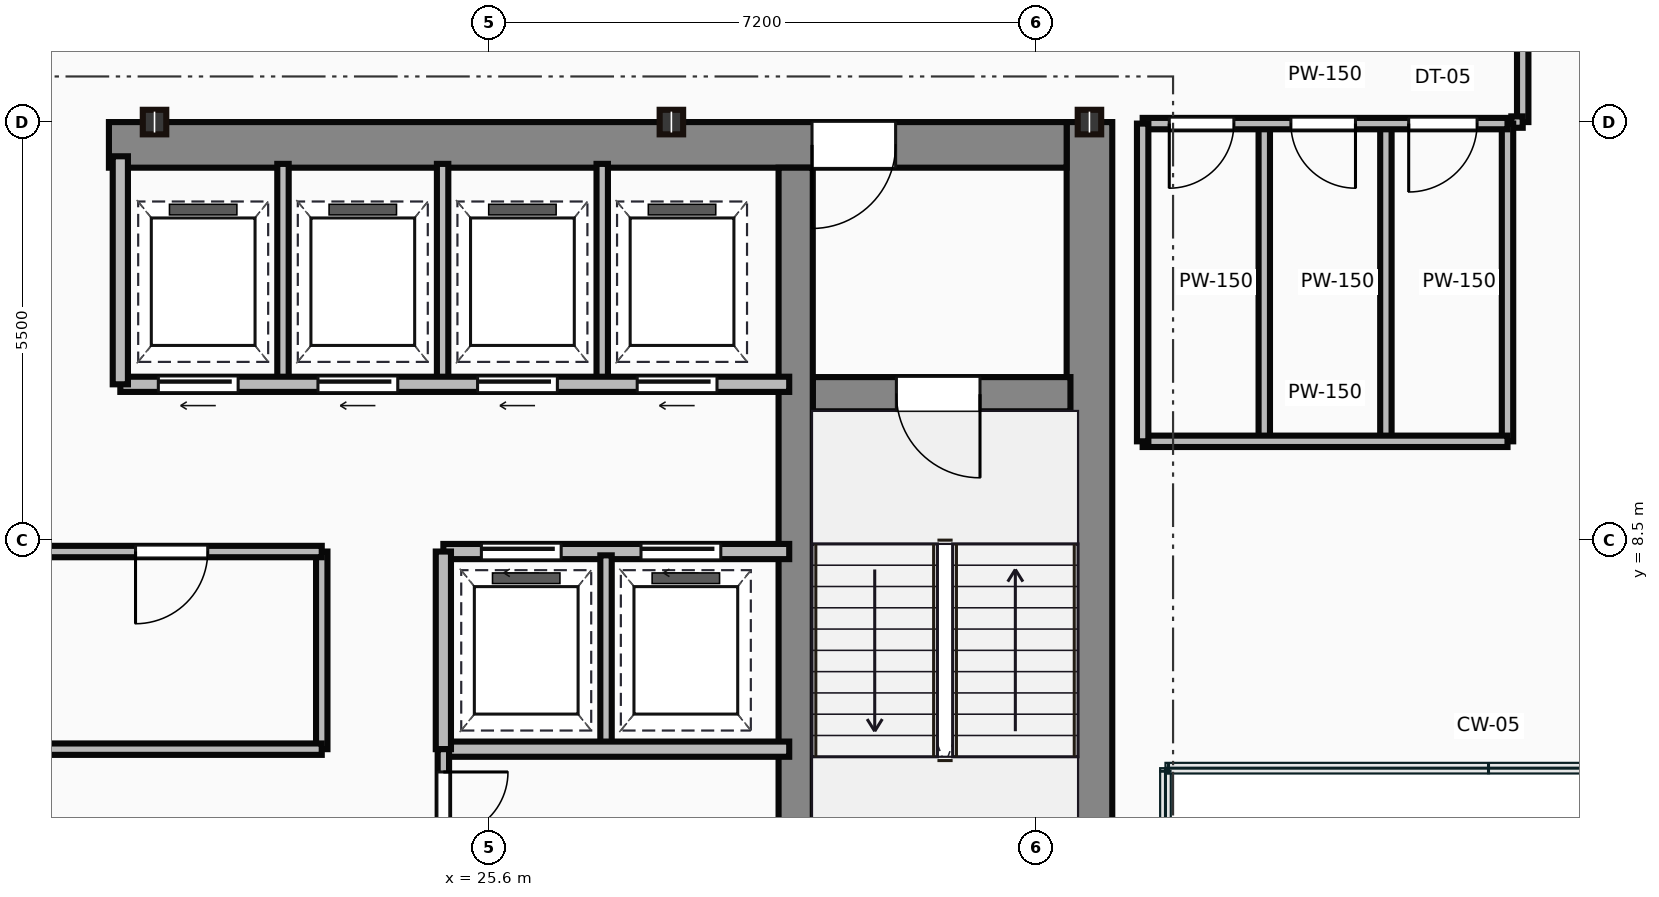
"""IFC4 building model, lengths in metres.
Left out: names, types, materials, properties, quantities, classifications, styles, units other than length and angle.
Written with IfcOpenShell. Run it as: python <this file> out.ifc"""

import sys

from ifc_helpers import new_model, si_unit, direction, frame, frame_2d, origin, origin_2d, place, context, subcontext, project, spatial, rectangle, i_section, extrude, source, transform, mapped, element, fill, save


model = new_model("IFC4")
c1 = context("Model", 3, precision=1e-05, world=origin(), true_north=direction((0.0, 1.0)))
c2 = subcontext(c1, "Body", "Model", "MODEL_VIEW")
j1 = project(units=[si_unit("LENGTHUNIT", "METRE"), si_unit("PLANEANGLEUNIT", "RADIAN")], contexts=[c1])
p1 = place(None, origin())
s1 = spatial("IfcSite", under=j1, at=p1, CompositionType="ELEMENT")
p2 = place(p1, origin())
s2 = spatial("IfcBuilding", under=s1, at=p2, CompositionType="ELEMENT")
p3 = place(p2, frame((0.0, 0.0, 262.45)))
s3 = spatial("IfcBuildingStorey", under=s2, at=p3, CompositionType="ELEMENT", Elevation=262.45)
m1 = source(origin(), c2, "Body", "SweptSolid", [
    extrude(rectangle(XDim=13.1, YDim=0.6, at=frame_2d((6.55, 0.0))), origin(), (0.0, 0.0, 1.0), 3.65),
])
p4 = place(p3, frame((33.5, 0.9, 0.0), z_axis=(0.0, 0.0, 1.0), x_axis=(0.0, 1.0, 0.0)))
e1 = element("IfcWall", 1, at=p4, inside=s3, PredefinedType="SHEAR", context=c2, shape_type="MappedRepresentation", body=[
    mapped(m1, transform((0.0, 0.0, 0.0))),
])
m2 = source(origin(), c2, "Body", "SweptSolid", [
    extrude(rectangle(XDim=12.6, YDim=0.6, at=frame_2d((6.3, 0.0))), origin(), (0.0, 0.0, 1.0), 3.65),
])
p5 = place(p3, frame((20.6, 13.7, 0.0), z_axis=(0.0, 0.0, 1.0), x_axis=(1.0, 0.0, 0.0)))
e2 = element("IfcWall", 2, at=p5, inside=s3, PredefinedType="SHEAR", context=c2, shape_type="MappedRepresentation", body=[
    mapped(m2, transform((0.0, 0.0, 0.0))),
])
p6 = place(p5, frame((9.25, 0.0, 0.0)))
e3 = element("IfcOpeningElement", 3, at=p6, cuts=e2, PredefinedType="OPENING", context=c2, shape_type="SweptSolid", body=[
    extrude(rectangle(XDim=1.1, YDim=2.15, at=frame_2d((0.55, 1.075))), frame((0.0, 0.31, 0.0), z_axis=(0.0, -1.0, 0.0), x_axis=(1.0, 0.0, 0.0)), (0.0, 0.0, 1.0), 0.62),
])
m3 = source(origin(), c2, "Body", "SweptSolid", [
    extrude(rectangle(XDim=12.5, YDim=0.45, at=frame_2d((6.25, 0.0))), origin(), (0.0, 0.0, 1.0), 3.65),
])
p7 = place(p3, frame((29.635, 0.9, 0.0), z_axis=(0.0, 0.0, 1.0), x_axis=(0.0, 1.0, 0.0)))
e4 = element("IfcWall", 4, at=p7, inside=s3, PredefinedType="SHEAR", context=c2, shape_type="MappedRepresentation", body=[
    mapped(m3, transform((0.0, 0.0, 0.0))),
])
m4 = source(origin(), c2, "Body", "SweptSolid", [
    extrude(rectangle(XDim=3.39, YDim=0.45, at=frame_2d((1.695, 0.0))), origin(), (0.0, 0.0, 1.0), 3.65),
])
p8 = place(p3, frame((29.86, 10.42, 0.0), z_axis=(0.0, 0.0, 1.0), x_axis=(1.0, 0.0, 0.0)))
e5 = element("IfcWall", 5, at=p8, inside=s3, PredefinedType="SHEAR", context=c2, shape_type="MappedRepresentation", body=[
    mapped(m4, transform((0.0, 0.0, 0.0))),
])
p9 = place(p8, frame((1.1, 0.0, 0.0)))
e6 = element("IfcOpeningElement", 6, at=p9, cuts=e5, PredefinedType="OPENING", context=c2, shape_type="SweptSolid", body=[
    extrude(rectangle(XDim=1.1, YDim=2.15, at=frame_2d((0.55, 1.075))), frame((0.0, 0.235, 0.0), z_axis=(0.0, -1.0, 0.0), x_axis=(1.0, 0.0, 0.0)), (0.0, 0.0, 1.0), 0.47),
])
m5 = source(origin(), c2, "Body", "SweptSolid", [
    extrude(i_section(OverallWidth=0.309, OverallDepth=0.323, WebThickness=0.014, FlangeThickness=0.023, at=origin_2d()), origin(), (0.0, 0.0, 1.0), 3.65),
])
for number, where, z_axis, x_axis in (
    (7, (21.2, 14.0, 0.0), (0.0, 0.0, 1.0), (1.0, 0.0, 0.0)),
    (8, (28.0, 14.0, 0.0), (0.0, 0.0, 1.0), (1.0, 0.0, 0.0)),
    (9, (33.5, 14.0, 0.0), (0.0, 0.0, 1.0), (1.0, 0.0, 0.0)),
):
    element("IfcColumn", number, at=place(p3, frame(where, z_axis=z_axis, x_axis=x_axis)), inside=s3, PredefinedType="COLUMN", context=c2, shape_type="MappedRepresentation", body=[
        mapped(m5, transform((0.0, 0.0, 0.0))),
    ])
m6 = source(origin(), c2, "Body", "SweptSolid", [
    extrude(rectangle(XDim=11.85, YDim=0.15, at=frame_2d((5.925, 0.0))), origin(), (0.0, 0.0, 1.0), 3.4),
])
p10 = place(p3, frame((11.55, 5.75, 0.0), z_axis=(0.0, 0.0, 1.0), x_axis=(1.0, 0.0, 0.0)))
e10 = element("IfcWall", 10, at=p10, inside=s3, PredefinedType="PARTITIONING", context=c2, shape_type="MappedRepresentation", body=[
    mapped(m6, transform((0.0, 0.0, 0.0))),
])
p11 = place(p3, frame((11.55, 8.35, 0.0), z_axis=(0.0, 0.0, 1.0), x_axis=(1.0, 0.0, 0.0)))
e11 = element("IfcWall", 11, at=p11, inside=s3, PredefinedType="PARTITIONING", context=c2, shape_type="MappedRepresentation", body=[
    mapped(m6, transform((0.0, 0.0, 0.0))),
])
p12 = place(p11, frame((1.1, 0.0, 0.0)))
e12 = element("IfcOpeningElement", 12, at=p12, cuts=e11, PredefinedType="OPENING", context=c2, shape_type="SweptSolid", body=[
    extrude(rectangle(XDim=0.95, YDim=2.15, at=frame_2d((0.475, 1.075))), frame((0.0, 0.085, 0.0), z_axis=(0.0, -1.0, 0.0), x_axis=(1.0, 0.0, 0.0)), (0.0, 0.0, 1.0), 0.17),
])
p13 = place(p11, frame((9.4, 0.0, 0.0)))
e13 = element("IfcOpeningElement", 13, at=p13, cuts=e11, PredefinedType="OPENING", context=c2, shape_type="SweptSolid", body=[
    extrude(rectangle(XDim=0.95, YDim=2.15, at=frame_2d((0.475, 1.075))), frame((0.0, 0.085, 0.0), z_axis=(0.0, -1.0, 0.0), x_axis=(1.0, 0.0, 0.0)), (0.0, 0.0, 1.0), 0.17),
])
m7 = source(origin(), c2, "Body", "SweptSolid", [
    extrude(rectangle(XDim=2.6, YDim=0.15, at=frame_2d((1.3, 0.0))), origin(), (0.0, 0.0, 1.0), 3.4),
])
p14 = place(p3, frame((23.4, 5.75, 0.0), z_axis=(0.0, 0.0, 1.0), x_axis=(0.0, 1.0, 0.0)))
e14 = element("IfcWall", 14, at=p14, inside=s3, PredefinedType="PARTITIONING", context=c2, shape_type="MappedRepresentation", body=[
    mapped(m7, transform((0.0, 0.0, 0.0))),
])
m8 = source(origin(), c2, "Body", "SweptSolid", [
    extrude(rectangle(XDim=8.8, YDim=0.2, at=frame_2d((4.4, 0.0))), origin(), (0.0, 0.0, 1.0), 3.4),
])
p15 = place(p3, frame((20.75, 10.55, 0.0), z_axis=(0.0, 0.0, 1.0), x_axis=(1.0, 0.0, 0.0)))
e15 = element("IfcWall", 15, at=p15, inside=s3, PredefinedType="PARTITIONING", context=c2, shape_type="MappedRepresentation", body=[
    mapped(m8, transform((0.0, 0.0, 0.0))),
])
p16 = place(p15, frame((0.5, 0.0, 0.0)))
e16 = element("IfcOpeningElement", 16, at=p16, cuts=e15, PredefinedType="OPENING", context=c2, shape_type="SweptSolid", body=[
    extrude(rectangle(XDim=1.05, YDim=2.15, at=frame_2d((0.525, 1.075))), frame((0.0, 0.11, 0.0), z_axis=(0.0, -1.0, 0.0), x_axis=(1.0, 0.0, 0.0)), (0.0, 0.0, 1.0), 0.22),
])
p17 = place(p15, frame((2.6, 0.0, 0.0)))
e17 = element("IfcOpeningElement", 17, at=p17, cuts=e15, PredefinedType="OPENING", context=c2, shape_type="SweptSolid", body=[
    extrude(rectangle(XDim=1.05, YDim=2.15, at=frame_2d((0.525, 1.075))), frame((0.0, 0.11, 0.0), z_axis=(0.0, -1.0, 0.0), x_axis=(1.0, 0.0, 0.0)), (0.0, 0.0, 1.0), 0.22),
])
p18 = place(p15, frame((4.7, 0.0, 0.0)))
e18 = element("IfcOpeningElement", 18, at=p18, cuts=e15, PredefinedType="OPENING", context=c2, shape_type="SweptSolid", body=[
    extrude(rectangle(XDim=1.05, YDim=2.15, at=frame_2d((0.525, 1.075))), frame((0.0, 0.11, 0.0), z_axis=(0.0, -1.0, 0.0), x_axis=(1.0, 0.0, 0.0)), (0.0, 0.0, 1.0), 0.22),
])
p19 = place(p15, frame((6.8, 0.0, 0.0)))
e19 = element("IfcOpeningElement", 19, at=p19, cuts=e15, PredefinedType="OPENING", context=c2, shape_type="SweptSolid", body=[
    extrude(rectangle(XDim=1.05, YDim=2.15, at=frame_2d((0.525, 1.075))), frame((0.0, 0.11, 0.0), z_axis=(0.0, -1.0, 0.0), x_axis=(1.0, 0.0, 0.0)), (0.0, 0.0, 1.0), 0.22),
])
m9 = source(origin(), c2, "Body", "SweptSolid", [
    extrude(rectangle(XDim=3.0, YDim=0.2, at=frame_2d((1.5, 0.0))), origin(), (0.0, 0.0, 1.0), 3.4),
])
p20 = place(p3, frame((20.75, 10.55, 0.0), z_axis=(0.0, 0.0, 1.0), x_axis=(0.0, 1.0, 0.0)))
e20 = element("IfcWall", 20, at=p20, inside=s3, PredefinedType="PARTITIONING", context=c2, shape_type="MappedRepresentation", body=[
    mapped(m9, transform((0.0, 0.0, 0.0))),
])
m10 = source(origin(), c2, "Body", "SweptSolid", [
    extrude(rectangle(XDim=2.85, YDim=0.15, at=frame_2d((1.425, 0.0))), origin(), (0.0, 0.0, 1.0), 3.4),
])
for number, where, z_axis, x_axis in (
    (21, (22.89, 10.6, 0.0), (0.0, 0.0, 1.0), (0.0, 1.0, 0.0)),
    (22, (24.99, 10.6, 0.0), (0.0, 0.0, 1.0), (0.0, 1.0, 0.0)),
    (23, (27.09, 10.6, 0.0), (0.0, 0.0, 1.0), (0.0, 1.0, 0.0)),
):
    element("IfcWall", number, at=place(p3, frame(where, z_axis=z_axis, x_axis=x_axis)), inside=s3, PredefinedType="PARTITIONING", context=c2, shape_type="MappedRepresentation", body=[
        mapped(m10, transform((0.0, 0.0, 0.0))),
    ])
m11 = source(origin(), c2, "Body", "SweptSolid", [
    extrude(rectangle(XDim=4.55, YDim=0.2, at=frame_2d((2.275, 0.0))), origin(), (0.0, 0.0, 1.0), 3.4),
])
p21 = place(p3, frame((25.0, 8.35, 0.0), z_axis=(0.0, 0.0, 1.0), x_axis=(1.0, 0.0, 0.0)))
e24 = element("IfcWall", 24, at=p21, inside=s3, PredefinedType="PARTITIONING", context=c2, shape_type="MappedRepresentation", body=[
    mapped(m11, transform((0.0, 0.0, 0.0))),
])
p22 = place(p21, frame((0.5, 0.0, 0.0)))
e25 = element("IfcOpeningElement", 25, at=p22, cuts=e24, PredefinedType="OPENING", context=c2, shape_type="SweptSolid", body=[
    extrude(rectangle(XDim=1.05, YDim=2.15, at=frame_2d((0.525, 1.075))), frame((0.0, 0.11, 0.0), z_axis=(0.0, -1.0, 0.0), x_axis=(1.0, 0.0, 0.0)), (0.0, 0.0, 1.0), 0.22),
])
p23 = place(p21, frame((2.6, 0.0, 0.0)))
e26 = element("IfcOpeningElement", 26, at=p23, cuts=e24, PredefinedType="OPENING", context=c2, shape_type="SweptSolid", body=[
    extrude(rectangle(XDim=1.05, YDim=2.15, at=frame_2d((0.525, 1.075))), frame((0.0, 0.11, 0.0), z_axis=(0.0, -1.0, 0.0), x_axis=(1.0, 0.0, 0.0)), (0.0, 0.0, 1.0), 0.22),
])
p24 = place(p3, frame((25.0, 5.75, 0.0), z_axis=(0.0, 0.0, 1.0), x_axis=(1.0, 0.0, 0.0)))
e27 = element("IfcWall", 27, at=p24, inside=s3, PredefinedType="PARTITIONING", context=c2, shape_type="MappedRepresentation", body=[
    mapped(m11, transform((0.0, 0.0, 0.0))),
])
m12 = source(origin(), c2, "Body", "SweptSolid", [
    extrude(rectangle(XDim=2.6, YDim=0.2, at=frame_2d((1.3, 0.0))), origin(), (0.0, 0.0, 1.0), 3.4),
])
p25 = place(p3, frame((25.0, 5.75, 0.0), z_axis=(0.0, 0.0, 1.0), x_axis=(0.0, 1.0, 0.0)))
e28 = element("IfcWall", 28, at=p25, inside=s3, PredefinedType="PARTITIONING", context=c2, shape_type="MappedRepresentation", body=[
    mapped(m12, transform((0.0, 0.0, 0.0))),
])
m13 = source(origin(), c2, "Body", "SweptSolid", [
    extrude(rectangle(XDim=2.5, YDim=0.15, at=frame_2d((1.25, 0.0))), origin(), (0.0, 0.0, 1.0), 3.4),
])
p26 = place(p3, frame((27.14, 5.8, 0.0), z_axis=(0.0, 0.0, 1.0), x_axis=(0.0, 1.0, 0.0)))
e29 = element("IfcWall", 29, at=p26, inside=s3, PredefinedType="PARTITIONING", context=c2, shape_type="MappedRepresentation", body=[
    mapped(m13, transform((0.0, 0.0, 0.0))),
])
m14 = source(origin(), c2, "Body", "SweptSolid", [
    extrude(rectangle(XDim=4.9, YDim=0.15, at=frame_2d((2.45, 0.0))), origin(), (0.0, 0.0, 1.0), 3.4),
])
p27 = place(p3, frame((25.0, 0.85, 0.0), z_axis=(0.0, 0.0, 1.0), x_axis=(0.0, 1.0, 0.0)))
e30 = element("IfcWall", 30, at=p27, inside=s3, PredefinedType="PARTITIONING", context=c2, shape_type="MappedRepresentation", body=[
    mapped(m14, transform((0.0, 0.0, 0.0))),
])
p28 = place(p27, frame((2.0, 0.0, 0.0)))
e31 = element("IfcOpeningElement", 31, at=p28, cuts=e30, PredefinedType="OPENING", context=c2, shape_type="SweptSolid", body=[
    extrude(rectangle(XDim=0.95, YDim=2.15, at=frame_2d((0.475, 1.075))), frame((0.0, 0.085, 0.0), z_axis=(0.0, -1.0, 0.0), x_axis=(1.0, 0.0, 0.0)), (0.0, 0.0, 1.0), 0.17),
])
p29 = place(p27, frame((3.75, 0.0, 0.0)))
e32 = element("IfcOpeningElement", 32, at=p29, cuts=e30, PredefinedType="OPENING", context=c2, shape_type="SweptSolid", body=[
    extrude(rectangle(XDim=0.85, YDim=2.15, at=frame_2d((0.425, 1.075))), frame((0.0, 0.085, 0.0), z_axis=(0.0, -1.0, 0.0), x_axis=(1.0, 0.0, 0.0)), (0.0, 0.0, 1.0), 0.17),
])
m15 = source(origin(), c2, "Body", "SweptSolid", [
    extrude(rectangle(XDim=4.8, YDim=0.15, at=frame_2d((2.4, 0.0))), origin(), (0.0, 0.0, 1.0), 2.787),
])
p30 = place(p3, frame((34.2, 13.98, 0.0), z_axis=(0.0, 0.0, 1.0), x_axis=(1.0, 0.0, 0.0)))
e33 = element("IfcWall", 33, at=p30, inside=s3, PredefinedType="PARTITIONING", context=c2, shape_type="MappedRepresentation", body=[
    mapped(m15, transform((0.0, 0.0, 0.0))),
])
p31 = place(p30, frame((0.35, 0.0, 0.0)))
e34 = element("IfcOpeningElement", 34, at=p31, cuts=e33, PredefinedType="OPENING", context=c2, shape_type="SweptSolid", body=[
    extrude(rectangle(XDim=0.85, YDim=2.1, at=frame_2d((0.425, 1.05))), frame((0.0, 0.085, 0.0), z_axis=(0.0, -1.0, 0.0), x_axis=(1.0, 0.0, 0.0)), (0.0, 0.0, 1.0), 0.17),
])
p32 = place(p30, frame((1.95, 0.0, 0.0)))
e35 = element("IfcOpeningElement", 35, at=p32, cuts=e33, PredefinedType="OPENING", context=c2, shape_type="SweptSolid", body=[
    extrude(rectangle(XDim=0.85, YDim=2.1, at=frame_2d((0.425, 1.05))), frame((0.0, 0.085, 0.0), z_axis=(0.0, -1.0, 0.0), x_axis=(1.0, 0.0, 0.0)), (0.0, 0.0, 1.0), 0.17),
])
p33 = place(p30, frame((3.5, 0.0, 0.0)))
e36 = element("IfcOpeningElement", 36, at=p33, cuts=e33, PredefinedType="OPENING", context=c2, shape_type="SweptSolid", body=[
    extrude(rectangle(XDim=0.9, YDim=2.1, at=frame_2d((0.45, 1.05))), frame((0.0, 0.085, 0.0), z_axis=(0.0, -1.0, 0.0), x_axis=(1.0, 0.0, 0.0)), (0.0, 0.0, 1.0), 0.17),
])
m16 = source(origin(), c2, "Body", "SweptSolid", [
    extrude(rectangle(XDim=4.8, YDim=0.15, at=frame_2d((2.4, 0.0))), origin(), (0.0, 0.0, 1.0), 3.4),
])
p34 = place(p3, frame((34.2, 9.8, 0.0), z_axis=(0.0, 0.0, 1.0), x_axis=(1.0, 0.0, 0.0)))
e37 = element("IfcWall", 37, at=p34, inside=s3, PredefinedType="PARTITIONING", context=c2, shape_type="MappedRepresentation", body=[
    mapped(m16, transform((0.0, 0.0, 0.0))),
])
m17 = source(origin(), c2, "Body", "SweptSolid", [
    extrude(rectangle(XDim=4.18, YDim=0.15, at=frame_2d((2.09, 0.0))), origin(), (0.0, 0.0, 1.0), 3.4),
])
for number, where, z_axis, x_axis in (
    (38, (39.0, 9.8, 0.0), (0.0, 0.0, 1.0), (0.0, 1.0, 0.0)),
    (39, (34.2, 9.8, 0.0), (0.0, 0.0, 1.0), (0.0, 1.0, 0.0)),
    (40, (35.8, 9.8, 0.0), (0.0, 0.0, 1.0), (0.0, 1.0, 0.0)),
    (41, (37.4, 9.8, 0.0), (0.0, 0.0, 1.0), (0.0, 1.0, 0.0)),
):
    element("IfcWall", number, at=place(p3, frame(where, z_axis=z_axis, x_axis=x_axis)), inside=s3, PredefinedType="PARTITIONING", context=c2, shape_type="MappedRepresentation", body=[
        mapped(m17, transform((0.0, 0.0, 0.0))),
    ])
m18 = source(origin(), c2, "Body", "SweptSolid", [
    extrude(rectangle(XDim=2.2, YDim=0.15, at=frame_2d((1.1, 0.0))), origin(), (0.0, 0.0, 1.0), 3.4),
])
p35 = place(p3, frame((39.2, 16.2, 0.0), z_axis=(0.0, 0.0, 1.0), x_axis=(0.0, -1.0, 0.0)))
e42 = element("IfcWall", 42, at=p35, inside=s3, PredefinedType="PARTITIONING", context=c2, shape_type="MappedRepresentation", body=[
    mapped(m18, transform((0.0, 0.0, 0.0))),
])
m19 = source(origin(), c2, "Body", "SweptSolid", [
    extrude(rectangle(XDim=0.15, YDim=0.15, at=frame_2d((0.075, 0.0))), origin(), (0.0, 0.0, 1.0), 3.4),
])
p36 = place(p3, frame((39.2, 14.0, 0.0), z_axis=(0.0, 0.0, 1.0), x_axis=(-1.0, 0.0, 0.0)))
e43 = element("IfcWall", 43, at=p36, inside=s3, PredefinedType="PARTITIONING", context=c2, shape_type="MappedRepresentation", body=[
    mapped(m19, transform((0.0, 0.0, 0.0))),
])
m20 = source(origin(), c2, "Body", "SweptSolid", [
    extrude(rectangle(XDim=1.1, YDim=2.15, at=frame_2d((0.55, 1.075))), frame((0.0, 0.025, 0.0), z_axis=(0.0, -1.0, 0.0), x_axis=(1.0, 0.0, 0.0)), (0.0, 0.0, 1.0), 0.05),
])
p37 = place(p9, frame((1.1, 0.0, 0.0), z_axis=(0.0, 0.0, 1.0), x_axis=(-1.0, 0.0, 0.0)))
e44 = element("IfcDoor", 44, at=p37, inside=s3, OperationType="SINGLE_SWING_RIGHT", PredefinedType="DOOR", context=c2, shape_type="MappedRepresentation", body=[
    mapped(m20, transform((0.0, 0.0, 0.0))),
])
fill(e6, e44)
p38 = place(p6, origin())
e45 = element("IfcDoor", 45, at=p38, inside=s3, OperationType="SINGLE_SWING_LEFT", PredefinedType="DOOR", context=c2, shape_type="MappedRepresentation", body=[
    mapped(m20, transform((0.0, 0.0, 0.0))),
])
fill(e3, e45)
m21 = source(origin(), c2, "Body", "SweptSolid", [
    extrude(rectangle(XDim=0.95, YDim=2.15, at=frame_2d((0.475, 1.075))), frame((0.0, 0.025, 0.0), z_axis=(0.0, -1.0, 0.0), x_axis=(1.0, 0.0, 0.0)), (0.0, 0.0, 1.0), 0.05),
])
p39 = place(p13, origin())
e46 = element("IfcDoor", 46, at=p39, inside=s3, OperationType="SINGLE_SWING_LEFT", PredefinedType="DOOR", context=c2, shape_type="MappedRepresentation", body=[
    mapped(m21, transform((0.0, 0.0, 0.0))),
])
fill(e13, e46)
m22 = source(origin(), c2, "Body", "SweptSolid", [
    extrude(rectangle(XDim=1.05, YDim=2.15, at=frame_2d((0.525, 1.075))), frame((0.0, 0.025, 0.0), z_axis=(0.0, -1.0, 0.0), x_axis=(1.0, 0.0, 0.0)), (0.0, 0.0, 1.0), 0.05),
])
p40 = place(p16, frame((1.05, 0.0, 0.0), z_axis=(0.0, 0.0, 1.0), x_axis=(-1.0, 0.0, 0.0)))
e47 = element("IfcDoor", 47, at=p40, inside=s3, OperationType="SLIDING_TO_LEFT", PredefinedType="DOOR", context=c2, shape_type="MappedRepresentation", body=[
    mapped(m22, transform((0.0, 0.0, 0.0))),
])
fill(e16, e47)
p41 = place(p17, frame((1.05, 0.0, 0.0), z_axis=(0.0, 0.0, 1.0), x_axis=(-1.0, 0.0, 0.0)))
e48 = element("IfcDoor", 48, at=p41, inside=s3, OperationType="SLIDING_TO_LEFT", PredefinedType="DOOR", context=c2, shape_type="MappedRepresentation", body=[
    mapped(m22, transform((0.0, 0.0, 0.0))),
])
fill(e17, e48)
p42 = place(p18, frame((1.05, 0.0, 0.0), z_axis=(0.0, 0.0, 1.0), x_axis=(-1.0, 0.0, 0.0)))
e49 = element("IfcDoor", 49, at=p42, inside=s3, OperationType="SLIDING_TO_LEFT", PredefinedType="DOOR", context=c2, shape_type="MappedRepresentation", body=[
    mapped(m22, transform((0.0, 0.0, 0.0))),
])
fill(e18, e49)
p43 = place(p19, frame((1.05, 0.0, 0.0), z_axis=(0.0, 0.0, 1.0), x_axis=(-1.0, 0.0, 0.0)))
e50 = element("IfcDoor", 50, at=p43, inside=s3, OperationType="SLIDING_TO_LEFT", PredefinedType="DOOR", context=c2, shape_type="MappedRepresentation", body=[
    mapped(m22, transform((0.0, 0.0, 0.0))),
])
fill(e19, e50)
p44 = place(p22, origin())
e51 = element("IfcDoor", 51, at=p44, inside=s3, OperationType="SLIDING_TO_LEFT", PredefinedType="DOOR", context=c2, shape_type="MappedRepresentation", body=[
    mapped(m22, transform((0.0, 0.0, 0.0))),
])
fill(e25, e51)
p45 = place(p23, origin())
e52 = element("IfcDoor", 52, at=p45, inside=s3, OperationType="SLIDING_TO_LEFT", PredefinedType="DOOR", context=c2, shape_type="MappedRepresentation", body=[
    mapped(m22, transform((0.0, 0.0, 0.0))),
])
fill(e26, e52)
m23 = source(origin(), c2, "Body", "SweptSolid", [
    extrude(rectangle(XDim=0.85, YDim=2.15, at=frame_2d((0.425, 1.075))), frame((0.0, 0.025, 0.0), z_axis=(0.0, -1.0, 0.0), x_axis=(1.0, 0.0, 0.0)), (0.0, 0.0, 1.0), 0.05),
])
p46 = place(p29, origin())
e53 = element("IfcDoor", 53, at=p46, inside=s3, OperationType="SINGLE_SWING_RIGHT", PredefinedType="DOOR", context=c2, shape_type="MappedRepresentation", body=[
    mapped(m23, transform((0.0, 0.0, 0.0))),
])
fill(e32, e53)
m24 = source(origin(), c2, "Body", "SweptSolid", [
    extrude(rectangle(XDim=0.85, YDim=2.1, at=frame_2d((0.425, 1.05))), frame((0.0, 0.025, 0.0), z_axis=(0.0, -1.0, 0.0), x_axis=(1.0, 0.0, 0.0)), (0.0, 0.0, 1.0), 0.05),
])
p47 = place(p31, frame((0.85, 0.0, 0.0), z_axis=(0.0, 0.0, 1.0), x_axis=(-1.0, 0.0, 0.0)))
e54 = element("IfcDoor", 54, at=p47, inside=s3, OperationType="SINGLE_SWING_LEFT", PredefinedType="DOOR", context=c2, shape_type="MappedRepresentation", body=[
    mapped(m24, transform((0.0, 0.0, 0.0))),
])
fill(e34, e54)
p48 = place(p32, frame((0.85, 0.0, 0.0), z_axis=(0.0, 0.0, 1.0), x_axis=(-1.0, 0.0, 0.0)))
e55 = element("IfcDoor", 55, at=p48, inside=s3, OperationType="SINGLE_SWING_RIGHT", PredefinedType="DOOR", context=c2, shape_type="MappedRepresentation", body=[
    mapped(m24, transform((0.0, 0.0, 0.0))),
])
fill(e35, e55)
m25 = source(origin(), c2, "Body", "SweptSolid", [
    extrude(rectangle(XDim=0.9, YDim=2.1, at=frame_2d((0.45, 1.05))), frame((0.0, 0.025, 0.0), z_axis=(0.0, -1.0, 0.0), x_axis=(1.0, 0.0, 0.0)), (0.0, 0.0, 1.0), 0.05),
])
p49 = place(p33, frame((0.9, 0.0, 0.0), z_axis=(0.0, 0.0, 1.0), x_axis=(-1.0, 0.0, 0.0)))
e56 = element("IfcDoor", 56, at=p49, inside=s3, OperationType="SINGLE_SWING_LEFT", PredefinedType="DOOR", context=c2, shape_type="MappedRepresentation", body=[
    mapped(m25, transform((0.0, 0.0, 0.0))),
])
fill(e36, e56)
save(model, sys.argv[1])
